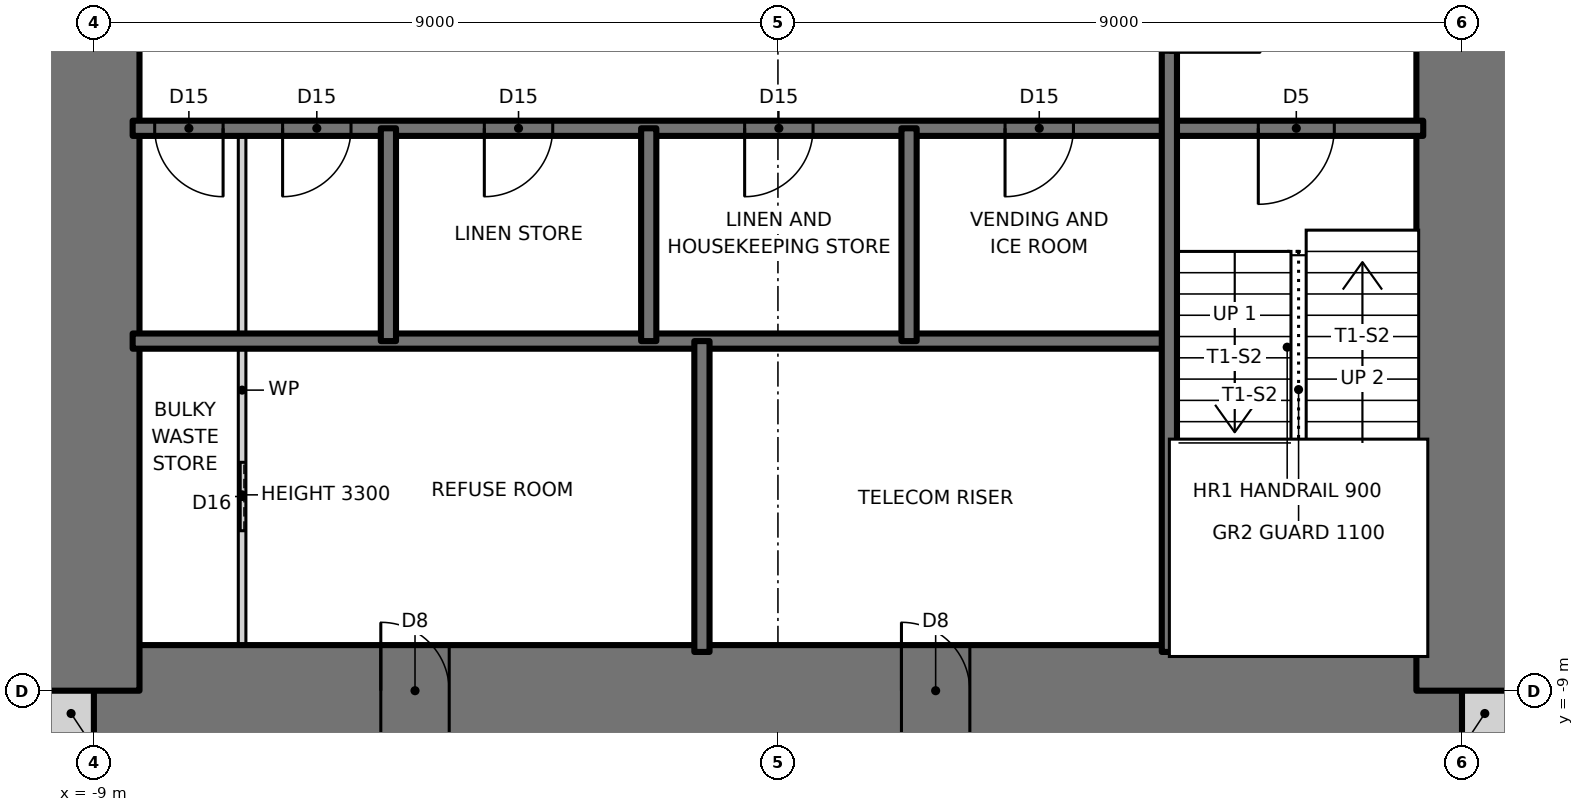
"""IFC4 building model, lengths in metres.
Left out: names, types, materials, properties, quantities, classifications, styles, units other than length and angle.
Written with IfcOpenShell. Run it as: python <this file> out.ifc"""

import sys

from ifc_helpers import new_model, si_unit, direction, frame, frame_2d, origin, place, context, subcontext, project, spatial, rectangle, extrude, element, fill, save


model = new_model("IFC4")
c1 = context("Model", 3, precision=1e-05, world=origin(), true_north=direction((0.0, 1.0)))
c2 = subcontext(c1, "Body", "Model", "MODEL_VIEW")
j1 = project(units=[si_unit("LENGTHUNIT", "METRE"), si_unit("PLANEANGLEUNIT", "RADIAN")], contexts=[c1])
p1 = place(None, origin())
s1 = spatial("IfcSite", under=j1, at=p1, CompositionType="ELEMENT")
p2 = place(p1, origin())
s2 = spatial("IfcBuilding", under=s1, at=p2, CompositionType="ELEMENT")
p3 = place(p2, frame((0.0, 0.0, 218.5)))
s3 = spatial("IfcBuildingStorey", under=s2, at=p3, CompositionType="ELEMENT", Elevation=218.5)
for number, where, z_axis, x_axis in (
    (1, (-9.6, -9.3, 0.0), (0.0, 0.0, 1.0), (1.0, 0.0, 0.0)),
    (2, (9.0, -9.3, 0.0), (0.0, 0.0, 1.0), (1.0, 0.0, 0.0)),
):
    element("IfcWall", number, at=place(p3, frame(where, z_axis=z_axis, x_axis=x_axis)), inside=s3, PredefinedType="SOLIDWALL", context=c2, shape_type="SweptSolid", body=[
        extrude(rectangle(XDim=0.6, YDim=0.6, at=frame_2d((0.3, 0.0))), origin(), (0.0, 0.0, 1.0), 3.5),
    ])
p4 = place(p3, frame((-9.0, -9.0, 0.0), z_axis=(0.0, 0.0, 1.0), x_axis=(1.0, 0.0, 0.0)))
e3 = element("IfcWall", 3, at=p4, inside=s3, PredefinedType="SHEAR", context=c2, shape_type="SweptSolid", body=[
    extrude(rectangle(XDim=18.0, YDim=1.2, at=frame_2d((9.0, 0.0))), origin(), (0.0, 0.0, 1.0), 3.5),
])
p5 = place(p4, frame((3.775, 0.0, 0.0)))
e4 = element("IfcOpeningElement", 4, at=p5, cuts=e3, PredefinedType="OPENING", context=c2, shape_type="SweptSolid", body=[
    extrude(rectangle(XDim=0.9, YDim=2.1, at=frame_2d((0.45, 1.05))), frame((0.0, 0.61, 0.0), z_axis=(0.0, -1.0, 0.0), x_axis=(1.0, 0.0, 0.0)), (0.0, 0.0, 1.0), 1.22),
])
p6 = place(p4, frame((10.625, 0.0, 0.0)))
e5 = element("IfcOpeningElement", 5, at=p6, cuts=e3, PredefinedType="OPENING", context=c2, shape_type="SweptSolid", body=[
    extrude(rectangle(XDim=0.9, YDim=2.1, at=frame_2d((0.45, 1.05))), frame((0.0, 0.61, 0.0), z_axis=(0.0, -1.0, 0.0), x_axis=(1.0, 0.0, 0.0)), (0.0, 0.0, 1.0), 1.22),
])
p7 = place(p3, frame((9.0, -9.0, 0.0), z_axis=(0.0, 0.0, 1.0), x_axis=(0.0, 1.0, 0.0)))
e6 = element("IfcWall", 6, at=p7, inside=s3, PredefinedType="SHEAR", context=c2, shape_type="SweptSolid", body=[
    extrude(rectangle(XDim=18.0, YDim=1.2, at=frame_2d((9.0, 0.0))), origin(), (0.0, 0.0, 1.0), 3.5),
])
p8 = place(p7, frame((8.5, 0.0, 0.0)))
e7 = element("IfcOpeningElement", 7, at=p8, cuts=e6, PredefinedType="OPENING", context=c2, shape_type="SweptSolid", body=[
    extrude(rectangle(XDim=1.0, YDim=2.1, at=frame_2d((0.5, 1.05))), frame((0.0, 0.61, 0.0), z_axis=(0.0, -1.0, 0.0), x_axis=(1.0, 0.0, 0.0)), (0.0, 0.0, 1.0), 1.22),
])
p9 = place(p3, frame((-9.0, 9.0, 0.0), z_axis=(0.0, 0.0, 1.0), x_axis=(0.0, -1.0, 0.0)))
e8 = element("IfcWall", 8, at=p9, inside=s3, PredefinedType="SHEAR", context=c2, shape_type="SweptSolid", body=[
    extrude(rectangle(XDim=18.0, YDim=1.2, at=frame_2d((9.0, 0.0))), origin(), (0.0, 0.0, 1.0), 3.5),
])
p10 = place(p9, frame((8.5, 0.0, 0.0)))
e9 = element("IfcOpeningElement", 9, at=p10, cuts=e8, PredefinedType="OPENING", context=c2, shape_type="SweptSolid", body=[
    extrude(rectangle(XDim=1.0, YDim=2.1, at=frame_2d((0.5, 1.05))), frame((0.0, 0.61, 0.0), z_axis=(0.0, -1.0, 0.0), x_axis=(1.0, 0.0, 0.0)), (0.0, 0.0, 1.0), 1.22),
])
p11 = place(p3, frame((-8.49, -4.4, 0.0), z_axis=(0.0, 0.0, 1.0), x_axis=(1.0, 0.0, 0.0)))
e10 = element("IfcWall", 10, at=p11, inside=s3, PredefinedType="SOLIDWALL", context=c2, shape_type="SweptSolid", body=[
    extrude(rectangle(XDim=13.64, YDim=0.2, at=frame_2d((6.82, 0.0))), origin(), (0.0, 0.0, 1.0), 3.5),
])
p12 = place(p3, frame((-8.49, -1.6, 0.0), z_axis=(0.0, 0.0, 1.0), x_axis=(1.0, 0.0, 0.0)))
e11 = element("IfcWall", 11, at=p12, inside=s3, PredefinedType="SOLIDWALL", context=c2, shape_type="SweptSolid", body=[
    extrude(rectangle(XDim=16.98, YDim=0.2, at=frame_2d((8.49, 0.0))), origin(), (0.0, 0.0, 1.0), 3.5),
])
p13 = place(p12, frame((14.81, 0.0, 0.0)))
e12 = element("IfcOpeningElement", 12, at=p13, cuts=e11, PredefinedType="OPENING", context=c2, shape_type="SweptSolid", body=[
    extrude(rectangle(XDim=1.0, YDim=2.1, at=frame_2d((0.5, 1.05))), frame((0.0, 0.11, 0.0), z_axis=(0.0, -1.0, 0.0), x_axis=(1.0, 0.0, 0.0)), (0.0, 0.0, 1.0), 0.22),
])
p14 = place(p12, frame((1.973, 0.0, 0.0)))
e13 = element("IfcOpeningElement", 13, at=p14, cuts=e11, PredefinedType="OPENING", context=c2, shape_type="SweptSolid", body=[
    extrude(rectangle(XDim=0.9, YDim=2.1, at=frame_2d((0.45, 1.05))), frame((0.0, 0.11, 0.0), z_axis=(0.0, -1.0, 0.0), x_axis=(1.0, 0.0, 0.0)), (0.0, 0.0, 1.0), 0.22),
])
p15 = place(p12, frame((0.29, 0.0, 0.0)))
e14 = element("IfcOpeningElement", 14, at=p15, cuts=e11, PredefinedType="OPENING", context=c2, shape_type="SweptSolid", body=[
    extrude(rectangle(XDim=0.9, YDim=2.1, at=frame_2d((0.45, 1.05))), frame((0.0, 0.11, 0.0), z_axis=(0.0, -1.0, 0.0), x_axis=(1.0, 0.0, 0.0)), (0.0, 0.0, 1.0), 0.22),
])
p16 = place(p12, frame((4.627, 0.0, 0.0)))
e15 = element("IfcOpeningElement", 15, at=p16, cuts=e11, PredefinedType="OPENING", context=c2, shape_type="SweptSolid", body=[
    extrude(rectangle(XDim=0.9, YDim=2.1, at=frame_2d((0.45, 1.05))), frame((0.0, 0.11, 0.0), z_axis=(0.0, -1.0, 0.0), x_axis=(1.0, 0.0, 0.0)), (0.0, 0.0, 1.0), 0.22),
])
p17 = place(p12, frame((8.052, 0.0, 0.0)))
e16 = element("IfcOpeningElement", 16, at=p17, cuts=e11, PredefinedType="OPENING", context=c2, shape_type="SweptSolid", body=[
    extrude(rectangle(XDim=0.9, YDim=2.1, at=frame_2d((0.45, 1.05))), frame((0.0, 0.11, 0.0), z_axis=(0.0, -1.0, 0.0), x_axis=(1.0, 0.0, 0.0)), (0.0, 0.0, 1.0), 0.22),
])
p18 = place(p12, frame((11.478, 0.0, 0.0)))
e17 = element("IfcOpeningElement", 17, at=p18, cuts=e11, PredefinedType="OPENING", context=c2, shape_type="SweptSolid", body=[
    extrude(rectangle(XDim=0.9, YDim=2.1, at=frame_2d((0.45, 1.05))), frame((0.0, 0.11, 0.0), z_axis=(0.0, -1.0, 0.0), x_axis=(1.0, 0.0, 0.0)), (0.0, 0.0, 1.0), 0.22),
])
p19 = place(p3, frame((5.15, -8.49, 0.0), z_axis=(0.0, 0.0, 1.0), x_axis=(0.0, 1.0, 0.0)))
e18 = element("IfcWall", 18, at=p19, inside=s3, PredefinedType="SOLIDWALL", context=c2, shape_type="SweptSolid", body=[
    extrude(rectangle(XDim=13.09, YDim=0.2, at=frame_2d((6.545, 0.0))), origin(), (0.0, 0.0, 1.0), 3.5),
])
p20 = place(p19, frame((7.89, 0.0, 0.0)))
e19 = element("IfcOpeningElement", 19, at=p20, cuts=e18, PredefinedType="OPENING", context=c2, shape_type="SweptSolid", body=[
    extrude(rectangle(XDim=1.2, YDim=2.1, at=frame_2d((0.6, 1.05))), frame((0.0, 0.11, 0.0), z_axis=(0.0, -1.0, 0.0), x_axis=(1.0, 0.0, 0.0)), (0.0, 0.0, 1.0), 0.22),
])
p21 = place(p3, frame((1.725, -4.4, 0.0), z_axis=(0.0, 0.0, 1.0), x_axis=(0.0, 1.0, 0.0)))
e20 = element("IfcWall", 20, at=p21, inside=s3, PredefinedType="SOLIDWALL", context=c2, shape_type="SweptSolid", body=[
    extrude(rectangle(XDim=2.8, YDim=0.2, at=frame_2d((1.4, 0.0))), origin(), (0.0, 0.0, 1.0), 3.5),
])
p22 = place(p3, frame((-1.0, -8.49, 0.0), z_axis=(0.0, 0.0, 1.0), x_axis=(0.0, 1.0, 0.0)))
e21 = element("IfcWall", 21, at=p22, inside=s3, PredefinedType="SOLIDWALL", context=c2, shape_type="SweptSolid", body=[
    extrude(rectangle(XDim=4.09, YDim=0.2, at=frame_2d((2.045, 0.0))), origin(), (0.0, 0.0, 1.0), 3.5),
])
for number, where, z_axis, x_axis in (
    (22, (-1.7, -4.4, 0.0), (0.0, 0.0, 1.0), (0.0, 1.0, 0.0)),
    (23, (-5.125, -4.4, 0.0), (0.0, 0.0, 1.0), (0.0, 1.0, 0.0)),
):
    element("IfcWall", number, at=place(p3, frame(where, z_axis=z_axis, x_axis=x_axis)), inside=s3, PredefinedType="SOLIDWALL", context=c2, shape_type="SweptSolid", body=[
        extrude(rectangle(XDim=2.8, YDim=0.2, at=frame_2d((1.4, 0.0))), origin(), (0.0, 0.0, 1.0), 3.5),
    ])
p23 = place(p3, frame((-7.05, -8.49, 0.0), z_axis=(0.0, 0.0, 1.0), x_axis=(0.0, 1.0, 0.0)))
e24 = element("IfcWall", 24, at=p23, inside=s3, PredefinedType="PARTITIONING", context=c2, shape_type="SweptSolid", body=[
    extrude(rectangle(XDim=6.89, YDim=0.1, at=frame_2d((3.445, 0.0))), origin(), (0.0, 0.0, 1.0), 3.3),
])
p24 = place(p23, frame((1.595, 0.0, 0.0)))
e25 = element("IfcOpeningElement", 25, at=p24, cuts=e24, PredefinedType="OPENING", context=c2, shape_type="SweptSolid", body=[
    extrude(rectangle(XDim=0.9, YDim=2.1, at=frame_2d((0.45, 1.05))), frame((0.0, 0.06, 0.0), z_axis=(0.0, -1.0, 0.0), x_axis=(1.0, 0.0, 0.0)), (0.0, 0.0, 1.0), 0.12),
])
p25 = place(p13, frame((1.0, 0.0, 0.0), z_axis=(0.0, 0.0, 1.0), x_axis=(-1.0, 0.0, 0.0)))
e26 = element("IfcDoor", 26, at=p25, inside=s3, OperationType="SINGLE_SWING_RIGHT", PredefinedType="DOOR", context=c2, shape_type="SweptSolid", body=[
    extrude(rectangle(XDim=1.0, YDim=2.1, at=frame_2d((0.5, 1.05))), frame((0.0, 0.025, 0.0), z_axis=(0.0, -1.0, 0.0), x_axis=(1.0, 0.0, 0.0)), (0.0, 0.0, 1.0), 0.05),
])
fill(e12, e26)
p26 = place(p20, frame((1.2, 0.0, 0.0), z_axis=(0.0, 0.0, 1.0), x_axis=(-1.0, 0.0, 0.0)))
e27 = element("IfcDoor", 27, at=p26, inside=s3, OperationType="SINGLE_SWING_RIGHT", PredefinedType="DOOR", context=c2, shape_type="SweptSolid", body=[
    extrude(rectangle(XDim=1.2, YDim=2.1, at=frame_2d((0.6, 1.05))), frame((0.0, 0.025, 0.0), z_axis=(0.0, -1.0, 0.0), x_axis=(1.0, 0.0, 0.0)), (0.0, 0.0, 1.0), 0.05),
])
fill(e19, e27)
p27 = place(p14, frame((0.9, 0.0, 0.0), z_axis=(0.0, 0.0, 1.0), x_axis=(-1.0, 0.0, 0.0)))
e28 = element("IfcDoor", 28, at=p27, inside=s3, OperationType="SINGLE_SWING_RIGHT", PredefinedType="DOOR", context=c2, shape_type="SweptSolid", body=[
    extrude(rectangle(XDim=0.9, YDim=2.1, at=frame_2d((0.45, 1.05))), frame((0.0, 0.025, 0.0), z_axis=(0.0, -1.0, 0.0), x_axis=(1.0, 0.0, 0.0)), (0.0, 0.0, 1.0), 0.05),
])
fill(e13, e28)
p28 = place(p15, frame((0.9, 0.0, 0.0), z_axis=(0.0, 0.0, 1.0), x_axis=(-1.0, 0.0, 0.0)))
e29 = element("IfcDoor", 29, at=p28, inside=s3, OperationType="SINGLE_SWING_LEFT", PredefinedType="DOOR", context=c2, shape_type="SweptSolid", body=[
    extrude(rectangle(XDim=0.9, YDim=2.1, at=frame_2d((0.45, 1.05))), frame((0.0, 0.025, 0.0), z_axis=(0.0, -1.0, 0.0), x_axis=(1.0, 0.0, 0.0)), (0.0, 0.0, 1.0), 0.05),
])
fill(e14, e29)
p29 = place(p16, frame((0.9, 0.0, 0.0), z_axis=(0.0, 0.0, 1.0), x_axis=(-1.0, 0.0, 0.0)))
e30 = element("IfcDoor", 30, at=p29, inside=s3, OperationType="SINGLE_SWING_RIGHT", PredefinedType="DOOR", context=c2, shape_type="SweptSolid", body=[
    extrude(rectangle(XDim=0.9, YDim=2.1, at=frame_2d((0.45, 1.05))), frame((0.0, 0.025, 0.0), z_axis=(0.0, -1.0, 0.0), x_axis=(1.0, 0.0, 0.0)), (0.0, 0.0, 1.0), 0.05),
])
fill(e15, e30)
p30 = place(p17, frame((0.9, 0.0, 0.0), z_axis=(0.0, 0.0, 1.0), x_axis=(-1.0, 0.0, 0.0)))
e31 = element("IfcDoor", 31, at=p30, inside=s3, OperationType="SINGLE_SWING_RIGHT", PredefinedType="DOOR", context=c2, shape_type="SweptSolid", body=[
    extrude(rectangle(XDim=0.9, YDim=2.1, at=frame_2d((0.45, 1.05))), frame((0.0, 0.025, 0.0), z_axis=(0.0, -1.0, 0.0), x_axis=(1.0, 0.0, 0.0)), (0.0, 0.0, 1.0), 0.05),
])
fill(e16, e31)
p31 = place(p18, frame((0.9, 0.0, 0.0), z_axis=(0.0, 0.0, 1.0), x_axis=(-1.0, 0.0, 0.0)))
e32 = element("IfcDoor", 32, at=p31, inside=s3, OperationType="SINGLE_SWING_RIGHT", PredefinedType="DOOR", context=c2, shape_type="SweptSolid", body=[
    extrude(rectangle(XDim=0.9, YDim=2.1, at=frame_2d((0.45, 1.05))), frame((0.0, 0.025, 0.0), z_axis=(0.0, -1.0, 0.0), x_axis=(1.0, 0.0, 0.0)), (0.0, 0.0, 1.0), 0.05),
])
fill(e17, e32)
p32 = place(p24, origin())
e33 = element("IfcDoor", 33, at=p32, inside=s3, OperationType="SLIDING_TO_RIGHT", PredefinedType="DOOR", context=c2, shape_type="SweptSolid", body=[
    extrude(rectangle(XDim=0.9, YDim=2.1, at=frame_2d((0.45, 1.05))), frame((0.0, 0.025, 0.0), z_axis=(0.0, -1.0, 0.0), x_axis=(1.0, 0.0, 0.0)), (0.0, 0.0, 1.0), 0.05),
])
fill(e25, e33)
p33 = place(p5, origin())
e34 = element("IfcDoor", 34, at=p33, inside=s3, OperationType="SINGLE_SWING_LEFT", PredefinedType="DOOR", context=c2, shape_type="SweptSolid", body=[
    extrude(rectangle(XDim=0.9, YDim=2.1, at=frame_2d((0.45, 1.05))), frame((0.0, 0.025, 0.0), z_axis=(0.0, -1.0, 0.0), x_axis=(1.0, 0.0, 0.0)), (0.0, 0.0, 1.0), 0.05),
])
fill(e4, e34)
p34 = place(p6, origin())
e35 = element("IfcDoor", 35, at=p34, inside=s3, OperationType="SINGLE_SWING_LEFT", PredefinedType="DOOR", context=c2, shape_type="SweptSolid", body=[
    extrude(rectangle(XDim=0.9, YDim=2.1, at=frame_2d((0.45, 1.05))), frame((0.0, 0.025, 0.0), z_axis=(0.0, -1.0, 0.0), x_axis=(1.0, 0.0, 0.0)), (0.0, 0.0, 1.0), 0.05),
])
fill(e5, e35)
save(model, sys.argv[1])
